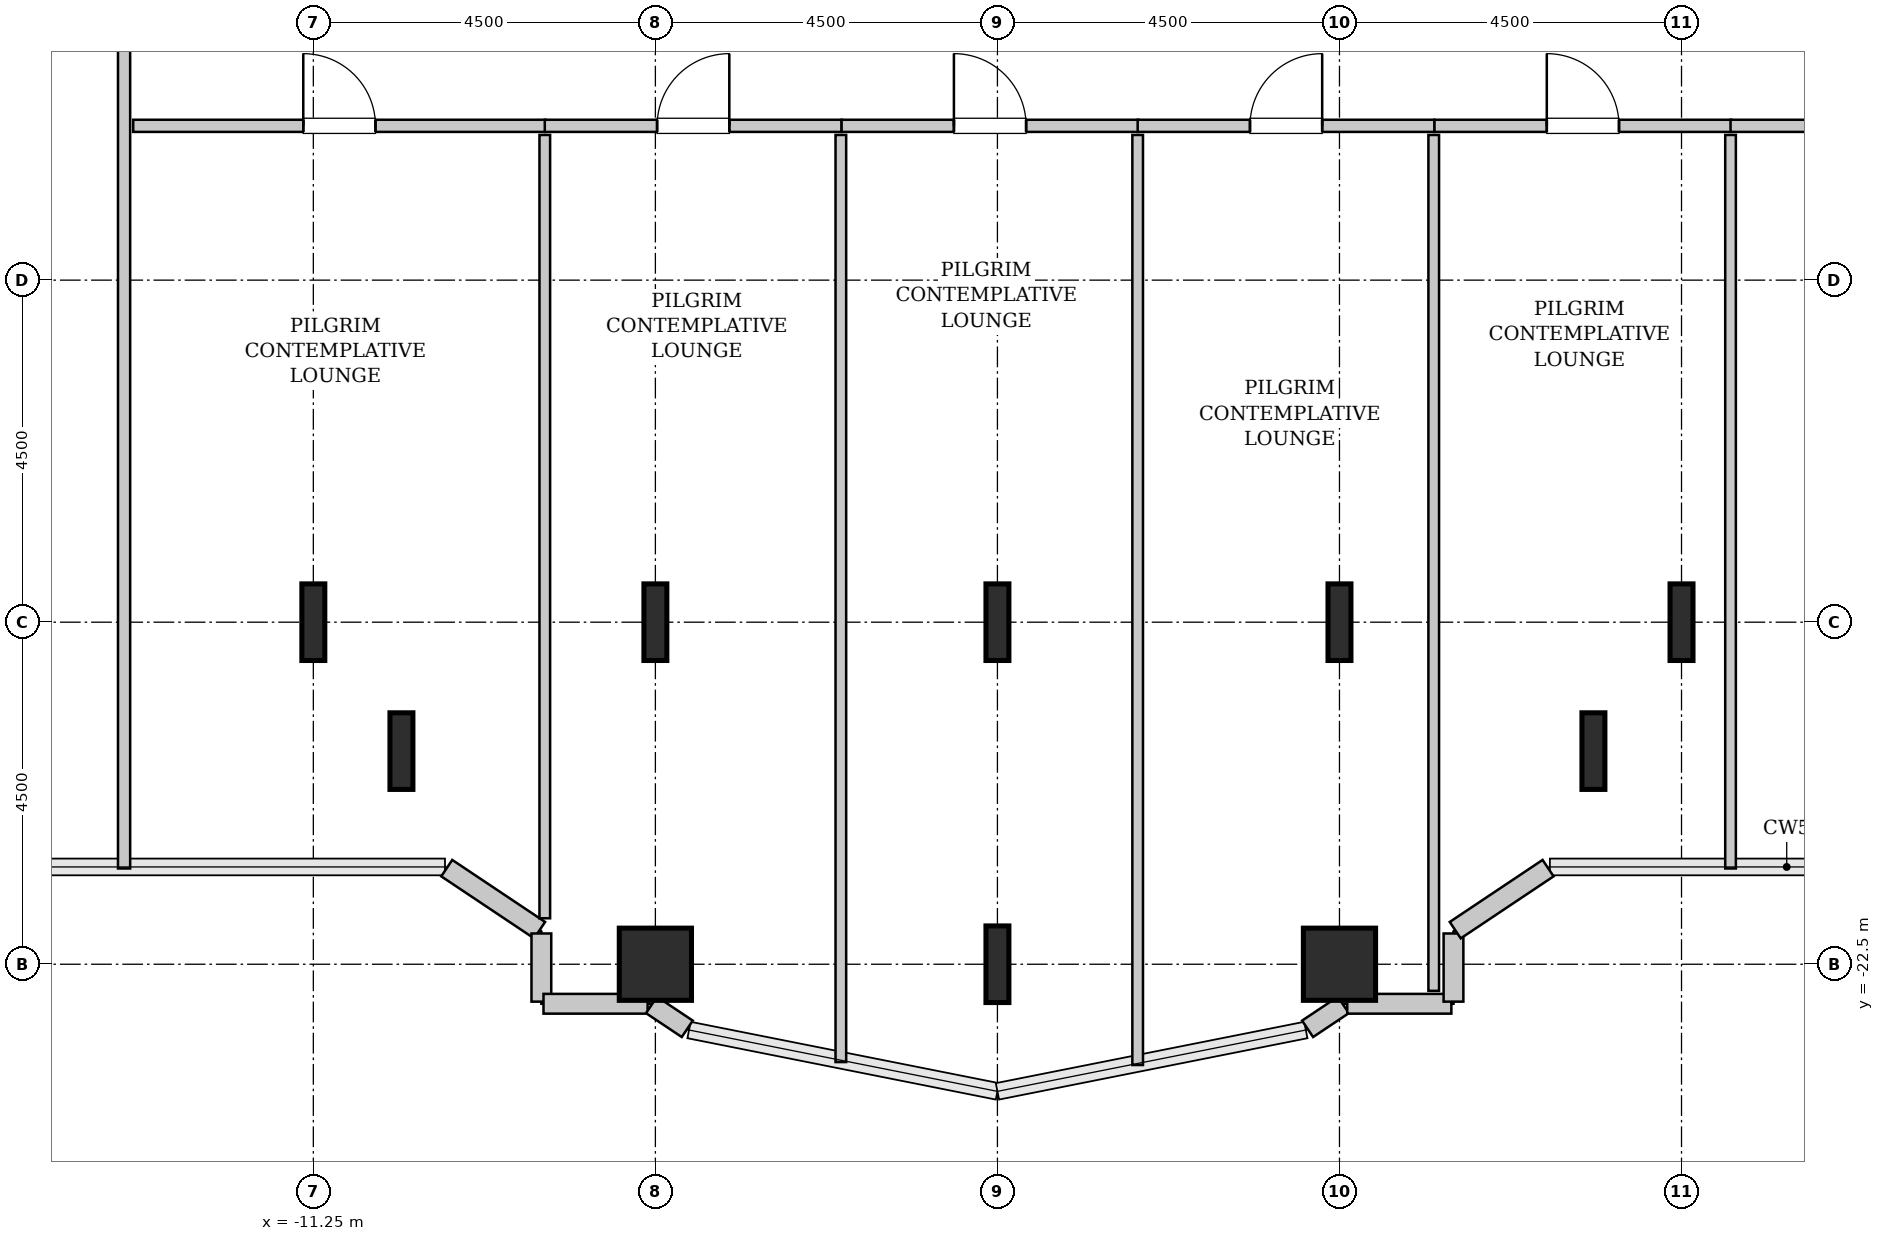
"""IFC4 building model, lengths in metres.
Left out: names, types, materials, properties, quantities, classifications, styles, units other than length and angle.
Written with IfcOpenShell. Run it as: python <this file> out.ifc"""

import sys

from ifc_helpers import new_model, si_unit, direction, frame, frame_2d, origin, origin_2d, place, context, subcontext, project, spatial, rectangle, hollow_rectangle, i_section, extrude, source, transform, mapped, element, fill, save


model = new_model("IFC4")
c1 = context("Model", 3, precision=1e-05, world=origin(), true_north=direction((0.0, 1.0)))
c2 = subcontext(c1, "Body", "Model", "MODEL_VIEW")
j1 = project(units=[si_unit("LENGTHUNIT", "METRE"), si_unit("PLANEANGLEUNIT", "RADIAN")], contexts=[c1])
p1 = place(None, origin())
s1 = spatial("IfcSite", under=j1, at=p1, CompositionType="ELEMENT")
p2 = place(p1, origin())
s2 = spatial("IfcBuilding", under=s1, at=p2, CompositionType="ELEMENT")
p3 = place(p2, frame((0.0, 0.0, 98.4)))
s3 = spatial("IfcBuildingStorey", under=s2, at=p3, CompositionType="ELEMENT", Elevation=98.4)
m1 = source(origin(), c2, "Body", "SweptSolid", [
    extrude(i_section(OverallWidth=0.302, OverallDepth=1.008, WebThickness=0.021, FlangeThickness=0.04, FilletRadius=0.03, at=origin_2d()), origin(), (0.0, 0.0, 1.0), 3.8),
])
for number, where, z_axis, x_axis in (
    (1, (-11.25, -18.0, 0.0), (0.0, 0.0, 1.0), (1.0, 0.0, 0.0)),
    (2, (-10.091, -19.696, 0.0), (0.0, 0.0, 1.0), (1.0, 0.0, 0.0)),
):
    element("IfcColumn", number, at=place(p3, frame(where, z_axis=z_axis, x_axis=x_axis)), inside=s3, PredefinedType="COLUMN", context=c2, shape_type="MappedRepresentation", body=[
        mapped(m1, transform((0.0, 0.0, 0.0), x_axis=(1.0, 0.0, 0.0), y_axis=(0.0, 1.0, 0.0), z_axis=(0.0, 0.0, 1.0), scale=1.0)),
    ])
m2 = source(origin(), c2, "Body", "SweptSolid", [
    extrude(hollow_rectangle(XDim=0.95, YDim=0.95, WallThickness=0.045, InnerFilletRadius=0.045, OuterFilletRadius=0.09, at=origin_2d()), origin(), (0.0, 0.0, 1.0), 3.8),
])
p4 = place(p3, frame((-6.75, -22.5, 0.0), z_axis=(0.0, 0.0, 1.0), x_axis=(1.0, 0.0, 0.0)))
e3 = element("IfcColumn", 3, at=p4, inside=s3, PredefinedType="COLUMN", context=c2, shape_type="MappedRepresentation", body=[
    mapped(m2, transform((0.0, 0.0, 0.0), x_axis=(1.0, 0.0, 0.0), y_axis=(0.0, 1.0, 0.0), z_axis=(0.0, 0.0, 1.0), scale=1.0)),
])
for number, where, z_axis, x_axis in (
    (4, (-6.75, -18.0, 0.0), (0.0, 0.0, 1.0), (1.0, 0.0, 0.0)),
    (5, (-2.25, -22.5, 0.0), (0.0, 0.0, 1.0), (1.0, 0.0, 0.0)),
    (6, (-2.25, -18.0, 0.0), (0.0, 0.0, 1.0), (1.0, 0.0, 0.0)),
):
    element("IfcColumn", number, at=place(p3, frame(where, z_axis=z_axis, x_axis=x_axis)), inside=s3, PredefinedType="COLUMN", context=c2, shape_type="MappedRepresentation", body=[
        mapped(m1, transform((0.0, 0.0, 0.0), x_axis=(1.0, 0.0, 0.0), y_axis=(0.0, 1.0, 0.0), z_axis=(0.0, 0.0, 1.0), scale=1.0)),
    ])
p5 = place(p3, frame((2.25, -22.5, 0.0), z_axis=(0.0, 0.0, 1.0), x_axis=(1.0, 0.0, 0.0)))
e7 = element("IfcColumn", 7, at=p5, inside=s3, PredefinedType="COLUMN", context=c2, shape_type="MappedRepresentation", body=[
    mapped(m2, transform((0.0, 0.0, 0.0), x_axis=(1.0, 0.0, 0.0), y_axis=(0.0, 1.0, 0.0), z_axis=(0.0, 0.0, 1.0), scale=1.0)),
])
for number, where, z_axis, x_axis in (
    (8, (2.25, -18.0, 0.0), (0.0, 0.0, 1.0), (1.0, 0.0, 0.0)),
    (9, (5.591, -19.696, 0.0), (0.0, 0.0, 1.0), (1.0, 0.0, 0.0)),
    (10, (6.75, -18.0, 0.0), (0.0, 0.0, 1.0), (1.0, 0.0, 0.0)),
):
    element("IfcColumn", number, at=place(p3, frame(where, z_axis=z_axis, x_axis=x_axis)), inside=s3, PredefinedType="COLUMN", context=c2, shape_type="MappedRepresentation", body=[
        mapped(m1, transform((0.0, 0.0, 0.0), x_axis=(1.0, 0.0, 0.0), y_axis=(0.0, 1.0, 0.0), z_axis=(0.0, 0.0, 1.0), scale=1.0)),
    ])
m3 = source(origin(), c2, "Body", "SweptSolid", [
    extrude(rectangle(XDim=1.469, YDim=0.26, at=frame_2d((0.734, 0.0))), origin(), (0.0, 0.0, 1.0), 3.55),
])
p6 = place(p3, frame((-9.495, -21.236, 0.0), z_axis=(0.0, 0.0, 1.0), x_axis=(0.831461760506, -0.555581983884, 0.0)))
e11 = element("IfcWall", 11, at=p6, inside=s3, PredefinedType="SOLIDWALL", context=c2, shape_type="MappedRepresentation", body=[
    mapped(m3, transform((0.0, 0.0, 0.0), x_axis=(1.0, 0.0, 0.0), y_axis=(0.0, 1.0, 0.0), z_axis=(0.0, 0.0, 1.0), scale=1.0)),
])
m4 = source(origin(), c2, "Body", "SweptSolid", [
    extrude(rectangle(XDim=0.897, YDim=0.26, at=frame_2d((0.448, 0.0))), origin(), (0.0, 0.0, 1.0), 3.55),
])
p7 = place(p3, frame((-8.25, -22.095, 0.0), z_axis=(0.0, 0.0, 1.0), x_axis=(0.0, -1.0, 0.0)))
e12 = element("IfcWall", 12, at=p7, inside=s3, PredefinedType="SOLIDWALL", context=c2, shape_type="MappedRepresentation", body=[
    mapped(m4, transform((0.0, 0.0, 0.0), x_axis=(1.0, 0.0, 0.0), y_axis=(0.0, 1.0, 0.0), z_axis=(0.0, 0.0, 1.0), scale=1.0)),
])
m5 = source(origin(), c2, "Body", "SweptSolid", [
    extrude(rectangle(XDim=1.37, YDim=0.26, at=frame_2d((0.685, 0.0))), origin(), (0.0, 0.0, 1.0), 3.55),
])
p8 = place(p3, frame((-8.222, -23.02, 0.0), z_axis=(0.0, 0.0, 1.0), x_axis=(1.0, 0.0, 0.0)))
e13 = element("IfcWall", 13, at=p8, inside=s3, PredefinedType="SOLIDWALL", context=c2, shape_type="MappedRepresentation", body=[
    mapped(m5, transform((0.0, 0.0, 0.0), x_axis=(1.0, 0.0, 0.0), y_axis=(0.0, 1.0, 0.0), z_axis=(0.0, 0.0, 1.0), scale=1.0)),
])
m6 = source(origin(), c2, "Body", "SweptSolid", [
    extrude(rectangle(XDim=0.565, YDim=0.26, at=frame_2d((0.283, 0.0))), origin(), (0.0, 0.0, 1.0), 3.55),
])
for number, where, z_axis, x_axis in (
    (14, (-6.801, -23.036, 0.0), (0.0, 0.0, 1.0), (0.832, -0.555, 0.0)),
    (15, (1.831, -23.35, 0.0), (0.0, 0.0, 1.0), (0.832, 0.555, 0.0)),
):
    element("IfcWall", number, at=place(p3, frame(where, z_axis=z_axis, x_axis=x_axis)), inside=s3, PredefinedType="SOLIDWALL", context=c2, shape_type="MappedRepresentation", body=[
        mapped(m6, transform((0.0, 0.0, 0.0), x_axis=(1.0, 0.0, 0.0), y_axis=(0.0, 1.0, 0.0), z_axis=(0.0, 0.0, 1.0), scale=1.0)),
    ])
p9 = place(p3, frame((2.352, -23.02, 0.0), z_axis=(0.0, 0.0, 1.0), x_axis=(1.0, 0.0, 0.0)))
e16 = element("IfcWall", 16, at=p9, inside=s3, PredefinedType="SOLIDWALL", context=c2, shape_type="MappedRepresentation", body=[
    mapped(m5, transform((0.0, 0.0, 0.0), x_axis=(1.0, 0.0, 0.0), y_axis=(0.0, 1.0, 0.0), z_axis=(0.0, 0.0, 1.0), scale=1.0)),
])
p10 = place(p3, frame((3.75, -22.992, 0.0), z_axis=(0.0, 0.0, 1.0), x_axis=(0.0, 1.0, 0.0)))
e17 = element("IfcWall", 17, at=p10, inside=s3, PredefinedType="SOLIDWALL", context=c2, shape_type="MappedRepresentation", body=[
    mapped(m4, transform((0.0, 0.0, 0.0), x_axis=(1.0, 0.0, 0.0), y_axis=(0.0, 1.0, 0.0), z_axis=(0.0, 0.0, 1.0), scale=1.0)),
])
p11 = place(p3, frame((3.773, -22.052, 0.0), z_axis=(0.0, 0.0, 1.0), x_axis=(0.831461760506, 0.555581983884, 0.0)))
e18 = element("IfcWall", 18, at=p11, inside=s3, PredefinedType="SOLIDWALL", context=c2, shape_type="MappedRepresentation", body=[
    mapped(m3, transform((0.0, 0.0, 0.0), x_axis=(1.0, 0.0, 0.0), y_axis=(0.0, 1.0, 0.0), z_axis=(0.0, 0.0, 1.0), scale=1.0)),
])
m7 = source(origin(), c2, "Body", "SweptSolid", [
    extrude(rectangle(XDim=12.845, YDim=0.16, at=frame_2d((6.422, 0.0))), origin(), (0.0, 0.0, 1.0), 3.535),
])
p12 = place(p3, frame((-13.74, -21.24, 0.0), z_axis=(0.0, 0.0, 1.0), x_axis=(0.0, 1.0, 0.0)))
e19 = element("IfcWall", 19, at=p12, inside=s3, PredefinedType="PARTITIONING", context=c2, shape_type="MappedRepresentation", body=[
    mapped(m7, transform((0.0, 0.0, 0.0), x_axis=(1.0, 0.0, 0.0), y_axis=(0.0, 1.0, 0.0), z_axis=(0.0, 0.0, 1.0), scale=1.0)),
])
p13 = place(p12, frame((10.812, 0.0, 0.0)))
e20 = element("IfcOpeningElement", 20, at=p13, cuts=e19, PredefinedType="OPENING", context=c2, shape_type="SweptSolid", body=[
    extrude(rectangle(XDim=0.95, YDim=2.1, at=frame_2d((0.475, 1.05))), frame((0.0, 0.09, 0.0), z_axis=(0.0, -1.0, 0.0), x_axis=(1.0, 0.0, 0.0)), (0.0, 0.0, 1.0), 0.18),
])
m8 = source(origin(), c2, "Body", "SweptSolid", [
    extrude(rectangle(XDim=5.425, YDim=0.16, at=frame_2d((2.712, 0.0))), origin(), (0.0, 0.0, 1.0), 3.535),
])
p14 = place(p3, frame((-13.62, -11.47, 0.0), z_axis=(0.0, 0.0, 1.0), x_axis=(1.0, 0.0, 0.0)))
e21 = element("IfcWall", 21, at=p14, inside=s3, PredefinedType="PARTITIONING", context=c2, shape_type="MappedRepresentation", body=[
    mapped(m8, transform((0.0, 0.0, 0.0), x_axis=(1.0, 0.0, 0.0), y_axis=(0.0, 1.0, 0.0), z_axis=(0.0, 0.0, 1.0), scale=1.0)),
])
p15 = place(p14, frame((2.238, 0.0, 0.0)))
e22 = element("IfcOpeningElement", 22, at=p15, cuts=e21, PredefinedType="OPENING", context=c2, shape_type="SweptSolid", body=[
    extrude(rectangle(XDim=0.95, YDim=2.1, at=frame_2d((0.475, 1.05))), frame((0.0, 0.09, 0.0), z_axis=(0.0, -1.0, 0.0), x_axis=(1.0, 0.0, 0.0)), (0.0, 0.0, 1.0), 0.18),
])
m9 = source(origin(), c2, "Body", "SweptSolid", [
    extrude(rectangle(XDim=10.305, YDim=0.14, at=frame_2d((5.153, 0.0))), origin(), (0.0, 0.0, 1.0), 3.535),
])
p16 = place(p3, frame((-8.205, -21.895, 0.0), z_axis=(0.0, 0.0, 1.0), x_axis=(0.0, 1.0, 0.0)))
e23 = element("IfcWall", 23, at=p16, inside=s3, PredefinedType="PARTITIONING", context=c2, shape_type="MappedRepresentation", body=[
    mapped(m9, transform((0.0, 0.0, 0.0), x_axis=(1.0, 0.0, 0.0), y_axis=(0.0, 1.0, 0.0), z_axis=(0.0, 0.0, 1.0), scale=1.0)),
])
m10 = source(origin(), c2, "Body", "SweptSolid", [
    extrude(rectangle(XDim=3.905, YDim=0.16, at=frame_2d((1.953, 0.0))), origin(), (0.0, 0.0, 1.0), 3.535),
])
p17 = place(p3, frame((-8.205, -11.47, 0.0), z_axis=(0.0, 0.0, 1.0), x_axis=(1.0, 0.0, 0.0)))
e24 = element("IfcWall", 24, at=p17, inside=s3, PredefinedType="PARTITIONING", context=c2, shape_type="MappedRepresentation", body=[
    mapped(m10, transform((0.0, 0.0, 0.0), x_axis=(1.0, 0.0, 0.0), y_axis=(0.0, 1.0, 0.0), z_axis=(0.0, 0.0, 1.0), scale=1.0)),
])
p18 = place(p17, frame((1.478, 0.0, 0.0)))
e25 = element("IfcOpeningElement", 25, at=p18, cuts=e24, PredefinedType="OPENING", context=c2, shape_type="SweptSolid", body=[
    extrude(rectangle(XDim=0.95, YDim=2.1, at=frame_2d((0.475, 1.05))), frame((0.0, 0.09, 0.0), z_axis=(0.0, -1.0, 0.0), x_axis=(1.0, 0.0, 0.0)), (0.0, 0.0, 1.0), 0.18),
])
m11 = source(origin(), c2, "Body", "SweptSolid", [
    extrude(rectangle(XDim=12.197, YDim=0.14, at=frame_2d((6.099, 0.0))), origin(), (0.0, 0.0, 1.0), 3.535),
])
p19 = place(p3, frame((-4.31, -23.787, 0.0), z_axis=(0.0, 0.0, 1.0), x_axis=(0.0, 1.0, 0.0)))
e26 = element("IfcWall", 26, at=p19, inside=s3, PredefinedType="PARTITIONING", context=c2, shape_type="MappedRepresentation", body=[
    mapped(m11, transform((0.0, 0.0, 0.0), x_axis=(1.0, 0.0, 0.0), y_axis=(0.0, 1.0, 0.0), z_axis=(0.0, 0.0, 1.0), scale=1.0)),
])
p20 = place(p3, frame((-4.3, -11.47, 0.0), z_axis=(0.0, 0.0, 1.0), x_axis=(1.0, 0.0, 0.0)))
e27 = element("IfcWall", 27, at=p20, inside=s3, PredefinedType="PARTITIONING", context=c2, shape_type="MappedRepresentation", body=[
    mapped(m10, transform((0.0, 0.0, 0.0), x_axis=(1.0, 0.0, 0.0), y_axis=(0.0, 1.0, 0.0), z_axis=(0.0, 0.0, 1.0), scale=1.0)),
])
p21 = place(p20, frame((1.478, 0.0, 0.0)))
e28 = element("IfcOpeningElement", 28, at=p21, cuts=e27, PredefinedType="OPENING", context=c2, shape_type="SweptSolid", body=[
    extrude(rectangle(XDim=0.95, YDim=2.1, at=frame_2d((0.475, 1.05))), frame((0.0, 0.09, 0.0), z_axis=(0.0, -1.0, 0.0), x_axis=(1.0, 0.0, 0.0)), (0.0, 0.0, 1.0), 0.18),
])
m12 = source(origin(), c2, "Body", "SweptSolid", [
    extrude(rectangle(XDim=12.236, YDim=0.14, at=frame_2d((6.118, 0.0))), origin(), (0.0, 0.0, 1.0), 3.535),
])
p22 = place(p3, frame((-0.405, -23.826, 0.0), z_axis=(0.0, 0.0, 1.0), x_axis=(0.0, 1.0, 0.0)))
e29 = element("IfcWall", 29, at=p22, inside=s3, PredefinedType="PARTITIONING", context=c2, shape_type="MappedRepresentation", body=[
    mapped(m12, transform((0.0, 0.0, 0.0), x_axis=(1.0, 0.0, 0.0), y_axis=(0.0, 1.0, 0.0), z_axis=(0.0, 0.0, 1.0), scale=1.0)),
])
p23 = place(p3, frame((-0.405, -11.47, 0.0), z_axis=(0.0, 0.0, 1.0), x_axis=(1.0, 0.0, 0.0)))
e30 = element("IfcWall", 30, at=p23, inside=s3, PredefinedType="PARTITIONING", context=c2, shape_type="MappedRepresentation", body=[
    mapped(m10, transform((0.0, 0.0, 0.0), x_axis=(1.0, 0.0, 0.0), y_axis=(0.0, 1.0, 0.0), z_axis=(0.0, 0.0, 1.0), scale=1.0)),
])
p24 = place(p23, frame((1.478, 0.0, 0.0)))
e31 = element("IfcOpeningElement", 31, at=p24, cuts=e30, PredefinedType="OPENING", context=c2, shape_type="SweptSolid", body=[
    extrude(rectangle(XDim=0.95, YDim=2.1, at=frame_2d((0.475, 1.05))), frame((0.0, 0.09, 0.0), z_axis=(0.0, -1.0, 0.0), x_axis=(1.0, 0.0, 0.0)), (0.0, 0.0, 1.0), 0.18),
])
m13 = source(origin(), c2, "Body", "SweptSolid", [
    extrude(rectangle(XDim=11.26, YDim=0.14, at=frame_2d((5.63, 0.0))), origin(), (0.0, 0.0, 1.0), 3.535),
])
p25 = place(p3, frame((3.49, -22.85, 0.0), z_axis=(0.0, 0.0, 1.0), x_axis=(0.0, 1.0, 0.0)))
e32 = element("IfcWall", 32, at=p25, inside=s3, PredefinedType="PARTITIONING", context=c2, shape_type="MappedRepresentation", body=[
    mapped(m13, transform((0.0, 0.0, 0.0), x_axis=(1.0, 0.0, 0.0), y_axis=(0.0, 1.0, 0.0), z_axis=(0.0, 0.0, 1.0), scale=1.0)),
])
p26 = place(p3, frame((3.5, -11.47, 0.0), z_axis=(0.0, 0.0, 1.0), x_axis=(1.0, 0.0, 0.0)))
e33 = element("IfcWall", 33, at=p26, inside=s3, PredefinedType="PARTITIONING", context=c2, shape_type="MappedRepresentation", body=[
    mapped(m10, transform((0.0, 0.0, 0.0), x_axis=(1.0, 0.0, 0.0), y_axis=(0.0, 1.0, 0.0), z_axis=(0.0, 0.0, 1.0), scale=1.0)),
])
p27 = place(p26, frame((1.478, 0.0, 0.0)))
e34 = element("IfcOpeningElement", 34, at=p27, cuts=e33, PredefinedType="OPENING", context=c2, shape_type="SweptSolid", body=[
    extrude(rectangle(XDim=0.95, YDim=2.1, at=frame_2d((0.475, 1.05))), frame((0.0, 0.09, 0.0), z_axis=(0.0, -1.0, 0.0), x_axis=(1.0, 0.0, 0.0)), (0.0, 0.0, 1.0), 0.18),
])
m14 = source(origin(), c2, "Body", "SweptSolid", [
    extrude(rectangle(XDim=9.65, YDim=0.14, at=frame_2d((4.825, 0.0))), origin(), (0.0, 0.0, 1.0), 3.535),
])
p28 = place(p3, frame((7.395, -21.24, 0.0), z_axis=(0.0, 0.0, 1.0), x_axis=(0.0, 1.0, 0.0)))
e35 = element("IfcWall", 35, at=p28, inside=s3, PredefinedType="PARTITIONING", context=c2, shape_type="MappedRepresentation", body=[
    mapped(m14, transform((0.0, 0.0, 0.0), x_axis=(1.0, 0.0, 0.0), y_axis=(0.0, 1.0, 0.0), z_axis=(0.0, 0.0, 1.0), scale=1.0)),
])
m15 = source(origin(), c2, "Body", "SweptSolid", [
    extrude(rectangle(XDim=6.225, YDim=0.16, at=frame_2d((3.113, 0.0))), origin(), (0.0, 0.0, 1.0), 3.535),
])
p29 = place(p3, frame((7.395, -11.47, 0.0), z_axis=(0.0, 0.0, 1.0), x_axis=(1.0, 0.0, 0.0)))
e36 = element("IfcWall", 36, at=p29, inside=s3, PredefinedType="PARTITIONING", context=c2, shape_type="MappedRepresentation", body=[
    mapped(m15, transform((0.0, 0.0, 0.0), x_axis=(1.0, 0.0, 0.0), y_axis=(0.0, 1.0, 0.0), z_axis=(0.0, 0.0, 1.0), scale=1.0)),
])
p30 = place(p29, frame((2.637, 0.0, 0.0)))
e37 = element("IfcOpeningElement", 37, at=p30, cuts=e36, PredefinedType="OPENING", context=c2, shape_type="SweptSolid", body=[
    extrude(rectangle(XDim=0.95, YDim=2.1, at=frame_2d((0.475, 1.05))), frame((0.0, 0.09, 0.0), z_axis=(0.0, -1.0, 0.0), x_axis=(1.0, 0.0, 0.0)), (0.0, 0.0, 1.0), 0.18),
])
m16 = source(origin(), c2, "Body", "SweptSolid", [
    extrude(rectangle(XDim=0.95, YDim=2.1, at=frame_2d((0.475, 1.05))), frame((0.0, 0.025, 0.0), z_axis=(0.0, -1.0, 0.0), x_axis=(1.0, 0.0, 0.0)), (0.0, 0.0, 1.0), 0.05),
])
p31 = place(p15, origin())
e38 = element("IfcDoor", 38, at=p31, inside=s3, OperationType="SINGLE_SWING_LEFT", PredefinedType="DOOR", context=c2, shape_type="MappedRepresentation", body=[
    mapped(m16, transform((0.0, 0.0, 0.0), x_axis=(1.0, 0.0, 0.0), y_axis=(0.0, 1.0, 0.0), z_axis=(0.0, 0.0, 1.0), scale=1.0)),
])
fill(e22, e38)
p32 = place(p18, origin())
e39 = element("IfcDoor", 39, at=p32, inside=s3, OperationType="SINGLE_SWING_RIGHT", PredefinedType="DOOR", context=c2, shape_type="MappedRepresentation", body=[
    mapped(m16, transform((0.0, 0.0, 0.0), x_axis=(1.0, 0.0, 0.0), y_axis=(0.0, 1.0, 0.0), z_axis=(0.0, 0.0, 1.0), scale=1.0)),
])
fill(e25, e39)
p33 = place(p21, origin())
e40 = element("IfcDoor", 40, at=p33, inside=s3, OperationType="SINGLE_SWING_LEFT", PredefinedType="DOOR", context=c2, shape_type="MappedRepresentation", body=[
    mapped(m16, transform((0.0, 0.0, 0.0), x_axis=(1.0, 0.0, 0.0), y_axis=(0.0, 1.0, 0.0), z_axis=(0.0, 0.0, 1.0), scale=1.0)),
])
fill(e28, e40)
p34 = place(p24, origin())
e41 = element("IfcDoor", 41, at=p34, inside=s3, OperationType="SINGLE_SWING_RIGHT", PredefinedType="DOOR", context=c2, shape_type="MappedRepresentation", body=[
    mapped(m16, transform((0.0, 0.0, 0.0), x_axis=(1.0, 0.0, 0.0), y_axis=(0.0, 1.0, 0.0), z_axis=(0.0, 0.0, 1.0), scale=1.0)),
])
fill(e31, e41)
p35 = place(p27, origin())
e42 = element("IfcDoor", 42, at=p35, inside=s3, OperationType="SINGLE_SWING_LEFT", PredefinedType="DOOR", context=c2, shape_type="MappedRepresentation", body=[
    mapped(m16, transform((0.0, 0.0, 0.0), x_axis=(1.0, 0.0, 0.0), y_axis=(0.0, 1.0, 0.0), z_axis=(0.0, 0.0, 1.0), scale=1.0)),
])
fill(e34, e42)
save(model, sys.argv[1])
